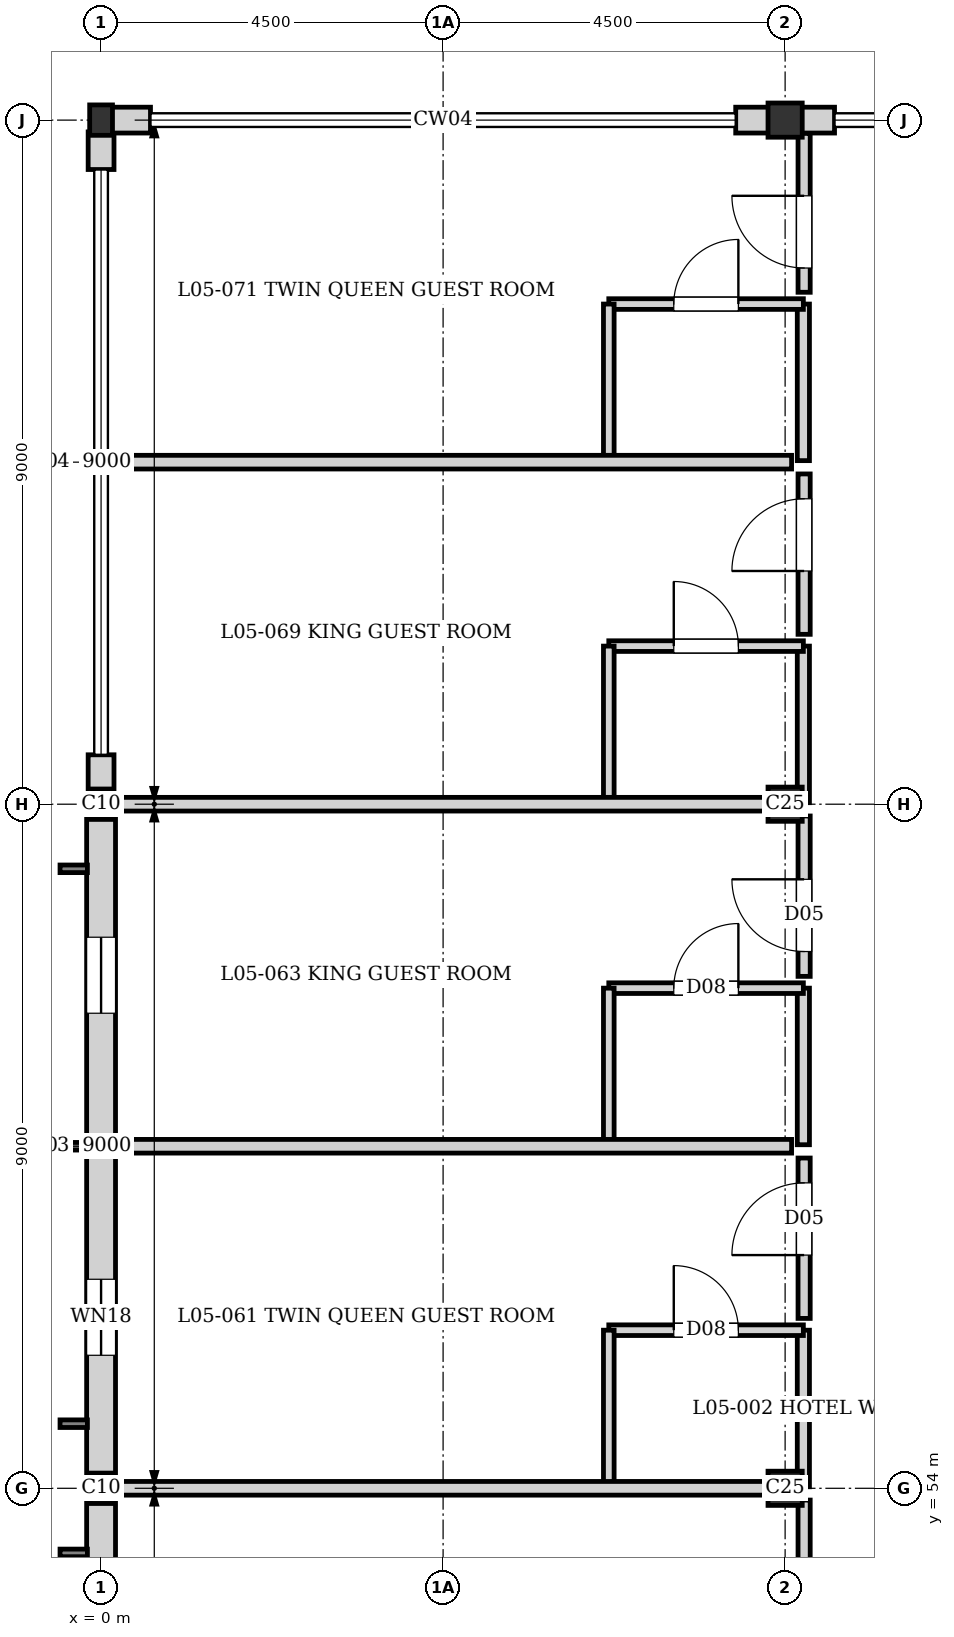
"""IFC4 building model, lengths in metres.
Left out: names, types, materials, properties, quantities, classifications, styles, units other than length and angle.
Written with IfcOpenShell. Run it as: python <this file> out.ifc"""

import sys

from ifc_helpers import new_model, si_unit, direction, frame, frame_2d, origin, origin_2d, place, context, subcontext, project, spatial, rectangle, i_section, extrude, element, fill, save


model = new_model("IFC4")
c1 = context("Model", 3, precision=1e-05, world=origin(), true_north=direction((0.0, 1.0)))
c2 = subcontext(c1, "Body", "Model", "MODEL_VIEW")
j1 = project(units=[si_unit("LENGTHUNIT", "METRE"), si_unit("PLANEANGLEUNIT", "RADIAN")], contexts=[c1])
p1 = place(None, origin())
s1 = spatial("IfcSite", under=j1, at=p1, CompositionType="ELEMENT")
p2 = place(p1, origin())
s2 = spatial("IfcBuilding", under=s1, at=p2, CompositionType="ELEMENT")
p3 = place(p2, frame((0.0, 0.0, 17.6)))
s3 = spatial("IfcBuildingStorey", under=s2, at=p3, CompositionType="ELEMENT", Elevation=17.6)
for number, where, z_axis, x_axis in (
    (1, (0.0, 54.0, 0.0), (0.0, 0.0, 1.0), (1.0, 0.0, 0.0)),
    (2, (0.0, 63.0, 0.0), (0.0, 0.0, 1.0), (1.0, 0.0, 0.0)),
    (3, (0.0, 72.0, 0.0), (0.0, 0.0, 1.0), (1.0, 0.0, 0.0)),
):
    element("IfcColumn", number, at=place(p3, frame(where, z_axis=z_axis, x_axis=x_axis)), inside=s3, PredefinedType="COLUMN", context=c2, shape_type="SweptSolid", body=[
        extrude(i_section(OverallWidth=0.3, OverallDepth=0.4, WebThickness=0.013, FlangeThickness=0.024, at=origin_2d()), origin(), (0.0, 0.0, 1.0), 3.04),
    ])
for number, where, z_axis, x_axis in (
    (4, (9.0, 54.0, 0.0), (0.0, 0.0, 1.0), (1.0, 0.0, 0.0)),
    (5, (9.0, 63.0, 0.0), (0.0, 0.0, 1.0), (1.0, 0.0, 0.0)),
    (6, (9.0, 72.0, 0.0), (0.0, 0.0, 1.0), (1.0, 0.0, 0.0)),
):
    element("IfcColumn", number, at=place(p3, frame(where, z_axis=z_axis, x_axis=x_axis)), inside=s3, PredefinedType="COLUMN", context=c2, shape_type="SweptSolid", body=[
        extrude(rectangle(XDim=0.45, YDim=0.45, at=origin_2d()), origin(), (0.0, 0.0, 1.0), 3.04),
    ])
p4 = place(p3, frame((0.0, 45.13, 0.0), z_axis=(0.0, 0.0, 1.0), x_axis=(0.0, 1.0, 0.0)))
e7 = element("IfcWall", 7, at=p4, inside=s3, PredefinedType="SOLIDWALL", context=c2, shape_type="SweptSolid", body=[
    extrude(rectangle(XDim=8.87, YDim=0.38, at=frame_2d((4.435, 0.0))), origin(), (0.0, 0.0, 1.0), 2.48),
])
p5 = place(p4, frame((1.62, 0.0, 0.35)))
e8 = element("IfcOpeningElement", 8, at=p5, cuts=e7, PredefinedType="OPENING", context=c2, shape_type="SweptSolid", body=[
    extrude(rectangle(XDim=1.0, YDim=1.6, at=frame_2d((0.5, 0.8))), frame((0.0, 0.2, 0.0), z_axis=(0.0, -1.0, 0.0), x_axis=(1.0, 0.0, 0.0)), (0.0, 0.0, 1.0), 0.4),
])
p6 = place(p4, frame((6.12, 0.0, 0.35)))
e9 = element("IfcOpeningElement", 9, at=p6, cuts=e7, PredefinedType="OPENING", context=c2, shape_type="SweptSolid", body=[
    extrude(rectangle(XDim=1.0, YDim=1.6, at=frame_2d((0.5, 0.8))), frame((0.0, 0.2, 0.0), z_axis=(0.0, -1.0, 0.0), x_axis=(1.0, 0.0, 0.0)), (0.0, 0.0, 1.0), 0.4),
])
p7 = place(p3, frame((0.0, 54.0, 0.0), z_axis=(0.0, 0.0, 1.0), x_axis=(0.0, 1.0, 0.0)))
e10 = element("IfcWall", 10, at=p7, inside=s3, PredefinedType="SOLIDWALL", context=c2, shape_type="SweptSolid", body=[
    extrude(rectangle(XDim=9.0, YDim=0.38, at=frame_2d((4.5, 0.0))), origin(), (0.0, 0.0, 1.0), 2.42),
])
p8 = place(p7, frame((1.75, 0.0, 0.35)))
e11 = element("IfcOpeningElement", 11, at=p8, cuts=e10, PredefinedType="OPENING", context=c2, shape_type="SweptSolid", body=[
    extrude(rectangle(XDim=1.0, YDim=1.6, at=frame_2d((0.5, 0.8))), frame((0.0, 0.2, 0.0), z_axis=(0.0, -1.0, 0.0), x_axis=(1.0, 0.0, 0.0)), (0.0, 0.0, 1.0), 0.4),
])
p9 = place(p7, frame((6.25, 0.0, 0.35)))
e12 = element("IfcOpeningElement", 12, at=p9, cuts=e10, PredefinedType="OPENING", context=c2, shape_type="SweptSolid", body=[
    extrude(rectangle(XDim=1.0, YDim=1.6, at=frame_2d((0.5, 0.8))), frame((0.0, 0.2, 0.0), z_axis=(0.0, -1.0, 0.0), x_axis=(1.0, 0.0, 0.0)), (0.0, 0.0, 1.0), 0.4),
])
p10 = place(p3, frame((0.0, 63.0, 0.0), z_axis=(0.0, 0.0, 1.0), x_axis=(0.0, 1.0, 0.0)))
e13 = element("IfcWall", 13, at=p10, inside=s3, PredefinedType="SOLIDWALL", context=c2, shape_type="SweptSolid", body=[
    extrude(rectangle(XDim=0.65, YDim=0.34, at=frame_2d((0.325, 0.0))), origin(), (0.0, 0.0, 1.0), 2.38),
])
p11 = place(p3, frame((0.0, 71.35, 0.0), z_axis=(0.0, 0.0, 1.0), x_axis=(0.0, 1.0, 0.0)))
e14 = element("IfcWall", 14, at=p11, inside=s3, PredefinedType="SOLIDWALL", context=c2, shape_type="SweptSolid", body=[
    extrude(rectangle(XDim=0.495, YDim=0.34, at=frame_2d((0.248, 0.0))), origin(), (0.0, 0.0, 1.0), 2.82),
])
for number, where, z_axis, x_axis in (
    (15, (0.0, 72.0, 0.0), (0.0, 0.0, 1.0), (1.0, 0.0, 0.0)),
    (16, (8.35, 72.0, 0.0), (0.0, 0.0, 1.0), (1.0, 0.0, 0.0)),
):
    element("IfcWall", number, at=place(p3, frame(where, z_axis=z_axis, x_axis=x_axis)), inside=s3, PredefinedType="SOLIDWALL", context=c2, shape_type="SweptSolid", body=[
        extrude(rectangle(XDim=0.65, YDim=0.34, at=frame_2d((0.325, 0.0))), origin(), (0.0, 0.0, 1.0), 2.38),
    ])
p12 = place(p3, frame((9.0, 72.0, 0.0), z_axis=(0.0, 0.0, 1.0), x_axis=(1.0, 0.0, 0.0)))
e17 = element("IfcWall", 17, at=p12, inside=s3, PredefinedType="SOLIDWALL", context=c2, shape_type="SweptSolid", body=[
    extrude(rectangle(XDim=0.65, YDim=0.34, at=frame_2d((0.325, 0.0))), origin(), (0.0, 0.0, 1.0), 2.55),
])
p13 = place(p3, frame((9.24, 54.02, 0.0), z_axis=(0.0, 0.0, 1.0), x_axis=(0.0, 1.0, 0.0)))
e18 = element("IfcWall", 18, at=p13, inside=s3, PredefinedType="PARTITIONING", context=c2, shape_type="SweptSolid", body=[
    extrude(rectangle(XDim=2.06, YDim=0.16, at=frame_2d((1.03, 0.0))), origin(), (0.0, 0.0, 1.0), 2.82),
])
p14 = place(p3, frame((6.68, 56.08, 0.0), z_axis=(0.0, 0.0, 1.0), x_axis=(1.0, 0.0, 0.0)))
e19 = element("IfcWall", 19, at=p14, inside=s3, PredefinedType="PLUMBINGWALL", context=c2, shape_type="SweptSolid", body=[
    extrude(rectangle(XDim=2.56, YDim=0.14, at=frame_2d((1.28, 0.0))), origin(), (0.0, 0.0, 1.0), 2.82),
])
p15 = place(p14, frame((0.855, 0.0, 0.0)))
e20 = element("IfcOpeningElement", 20, at=p15, cuts=e19, PredefinedType="OPENING", context=c2, shape_type="SweptSolid", body=[
    extrude(rectangle(XDim=0.85, YDim=2.04, at=frame_2d((0.425, 1.02))), frame((0.0, 0.08, 0.0), z_axis=(0.0, -1.0, 0.0), x_axis=(1.0, 0.0, 0.0)), (0.0, 0.0, 1.0), 0.16),
])
p16 = place(p3, frame((6.68, 54.02, 0.0), z_axis=(0.0, 0.0, 1.0), x_axis=(0.0, 1.0, 0.0)))
e21 = element("IfcWall", 21, at=p16, inside=s3, PredefinedType="PLUMBINGWALL", context=c2, shape_type="SweptSolid", body=[
    extrude(rectangle(XDim=2.06, YDim=0.14, at=frame_2d((1.03, 0.0))), origin(), (0.0, 0.0, 1.0), 2.82),
])
p17 = place(p3, frame((9.24, 58.52, 0.0), z_axis=(0.0, 0.0, 1.0), x_axis=(0.0, 1.0, 0.0)))
e22 = element("IfcWall", 22, at=p17, inside=s3, PredefinedType="PARTITIONING", context=c2, shape_type="SweptSolid", body=[
    extrude(rectangle(XDim=2.06, YDim=0.16, at=frame_2d((1.03, 0.0))), origin(), (0.0, 0.0, 1.0), 2.82),
])
p18 = place(p3, frame((6.68, 60.58, 0.0), z_axis=(0.0, 0.0, 1.0), x_axis=(1.0, 0.0, 0.0)))
e23 = element("IfcWall", 23, at=p18, inside=s3, PredefinedType="PLUMBINGWALL", context=c2, shape_type="SweptSolid", body=[
    extrude(rectangle(XDim=2.56, YDim=0.14, at=frame_2d((1.28, 0.0))), origin(), (0.0, 0.0, 1.0), 2.82),
])
p19 = place(p18, frame((0.855, 0.0, 0.0)))
e24 = element("IfcOpeningElement", 24, at=p19, cuts=e23, PredefinedType="OPENING", context=c2, shape_type="SweptSolid", body=[
    extrude(rectangle(XDim=0.85, YDim=2.04, at=frame_2d((0.425, 1.02))), frame((0.0, 0.08, 0.0), z_axis=(0.0, -1.0, 0.0), x_axis=(1.0, 0.0, 0.0)), (0.0, 0.0, 1.0), 0.16),
])
p20 = place(p3, frame((6.68, 58.52, 0.0), z_axis=(0.0, 0.0, 1.0), x_axis=(0.0, 1.0, 0.0)))
e25 = element("IfcWall", 25, at=p20, inside=s3, PredefinedType="PLUMBINGWALL", context=c2, shape_type="SweptSolid", body=[
    extrude(rectangle(XDim=2.06, YDim=0.14, at=frame_2d((1.03, 0.0))), origin(), (0.0, 0.0, 1.0), 2.82),
])
p21 = place(p3, frame((9.24, 63.02, 0.0), z_axis=(0.0, 0.0, 1.0), x_axis=(0.0, 1.0, 0.0)))
e26 = element("IfcWall", 26, at=p21, inside=s3, PredefinedType="PARTITIONING", context=c2, shape_type="SweptSolid", body=[
    extrude(rectangle(XDim=2.06, YDim=0.16, at=frame_2d((1.03, 0.0))), origin(), (0.0, 0.0, 1.0), 2.82),
])
p22 = place(p3, frame((6.68, 65.08, 0.0), z_axis=(0.0, 0.0, 1.0), x_axis=(1.0, 0.0, 0.0)))
e27 = element("IfcWall", 27, at=p22, inside=s3, PredefinedType="PLUMBINGWALL", context=c2, shape_type="SweptSolid", body=[
    extrude(rectangle(XDim=2.56, YDim=0.14, at=frame_2d((1.28, 0.0))), origin(), (0.0, 0.0, 1.0), 2.82),
])
p23 = place(p22, frame((0.855, 0.0, 0.0)))
e28 = element("IfcOpeningElement", 28, at=p23, cuts=e27, PredefinedType="OPENING", context=c2, shape_type="SweptSolid", body=[
    extrude(rectangle(XDim=0.85, YDim=2.04, at=frame_2d((0.425, 1.02))), frame((0.0, 0.08, 0.0), z_axis=(0.0, -1.0, 0.0), x_axis=(1.0, 0.0, 0.0)), (0.0, 0.0, 1.0), 0.16),
])
p24 = place(p3, frame((6.68, 63.02, 0.0), z_axis=(0.0, 0.0, 1.0), x_axis=(0.0, 1.0, 0.0)))
e29 = element("IfcWall", 29, at=p24, inside=s3, PredefinedType="PLUMBINGWALL", context=c2, shape_type="SweptSolid", body=[
    extrude(rectangle(XDim=2.06, YDim=0.14, at=frame_2d((1.03, 0.0))), origin(), (0.0, 0.0, 1.0), 2.82),
])
p25 = place(p3, frame((9.24, 67.52, 0.0), z_axis=(0.0, 0.0, 1.0), x_axis=(0.0, 1.0, 0.0)))
e30 = element("IfcWall", 30, at=p25, inside=s3, PredefinedType="PARTITIONING", context=c2, shape_type="SweptSolid", body=[
    extrude(rectangle(XDim=2.06, YDim=0.16, at=frame_2d((1.03, 0.0))), origin(), (0.0, 0.0, 1.0), 2.82),
])
p26 = place(p3, frame((6.68, 69.58, 0.0), z_axis=(0.0, 0.0, 1.0), x_axis=(1.0, 0.0, 0.0)))
e31 = element("IfcWall", 31, at=p26, inside=s3, PredefinedType="PLUMBINGWALL", context=c2, shape_type="SweptSolid", body=[
    extrude(rectangle(XDim=2.56, YDim=0.14, at=frame_2d((1.28, 0.0))), origin(), (0.0, 0.0, 1.0), 2.82),
])
p27 = place(p26, frame((0.855, 0.0, 0.0)))
e32 = element("IfcOpeningElement", 32, at=p27, cuts=e31, PredefinedType="OPENING", context=c2, shape_type="SweptSolid", body=[
    extrude(rectangle(XDim=0.85, YDim=2.04, at=frame_2d((0.425, 1.02))), frame((0.0, 0.08, 0.0), z_axis=(0.0, -1.0, 0.0), x_axis=(1.0, 0.0, 0.0)), (0.0, 0.0, 1.0), 0.16),
])
p28 = place(p3, frame((6.68, 67.52, 0.0), z_axis=(0.0, 0.0, 1.0), x_axis=(0.0, 1.0, 0.0)))
e33 = element("IfcWall", 33, at=p28, inside=s3, PredefinedType="PLUMBINGWALL", context=c2, shape_type="SweptSolid", body=[
    extrude(rectangle(XDim=2.06, YDim=0.14, at=frame_2d((1.03, 0.0))), origin(), (0.0, 0.0, 1.0), 2.82),
])
p29 = place(p3, frame((0.195, 54.0, 0.0), z_axis=(0.0, 0.0, 1.0), x_axis=(1.0, 0.0, 0.0)))
e34 = element("IfcWall", 34, at=p29, inside=s3, PredefinedType="PARTITIONING", context=c2, shape_type="SweptSolid", body=[
    extrude(rectangle(XDim=8.89, YDim=0.18, at=frame_2d((4.445, 0.0))), origin(), (0.0, 0.0, 1.0), 2.38),
])
p30 = place(p3, frame((0.195, 58.5, 0.0), z_axis=(0.0, 0.0, 1.0), x_axis=(1.0, 0.0, 0.0)))
e35 = element("IfcWall", 35, at=p30, inside=s3, PredefinedType="PARTITIONING", context=c2, shape_type="SweptSolid", body=[
    extrude(rectangle(XDim=8.89, YDim=0.18, at=frame_2d((4.445, 0.0))), origin(), (0.0, 0.0, 1.0), 2.82),
])
p31 = place(p3, frame((0.175, 63.0, 0.0), z_axis=(0.0, 0.0, 1.0), x_axis=(1.0, 0.0, 0.0)))
e36 = element("IfcWall", 36, at=p31, inside=s3, PredefinedType="PARTITIONING", context=c2, shape_type="SweptSolid", body=[
    extrude(rectangle(XDim=8.91, YDim=0.18, at=frame_2d((4.455, 0.0))), origin(), (0.0, 0.0, 1.0), 2.38),
])
p32 = place(p3, frame((0.095, 67.5, 0.0), z_axis=(0.0, 0.0, 1.0), x_axis=(1.0, 0.0, 0.0)))
e37 = element("IfcWall", 37, at=p32, inside=s3, PredefinedType="PARTITIONING", context=c2, shape_type="SweptSolid", body=[
    extrude(rectangle(XDim=8.99, YDim=0.18, at=frame_2d((4.495, 0.0))), origin(), (0.0, 0.0, 1.0), 2.82),
])
p33 = place(p3, frame((9.25, 51.735, 0.0), z_axis=(0.0, 0.0, 1.0), x_axis=(0.0, 1.0, 0.0)))
e38 = element("IfcWall", 38, at=p33, inside=s3, PredefinedType="PARTITIONING", context=c2, shape_type="SweptSolid", body=[
    extrude(rectangle(XDim=2.11, YDim=0.16, at=frame_2d((1.055, 0.0))), origin(), (0.0, 0.0, 1.0), 2.82),
])
p34 = place(p33, frame((0.327, 0.0, 0.0)))
e39 = element("IfcOpeningElement", 39, at=p34, cuts=e38, PredefinedType="OPENING", context=c2, shape_type="SweptSolid", body=[
    extrude(rectangle(XDim=0.95, YDim=2.15, at=frame_2d((0.475, 1.075))), frame((0.0, 0.09, 0.0), z_axis=(0.0, -1.0, 0.0), x_axis=(1.0, 0.0, 0.0)), (0.0, 0.0, 1.0), 0.18),
])
p35 = place(p3, frame((9.25, 56.235, 0.0), z_axis=(0.0, 0.0, 1.0), x_axis=(0.0, 1.0, 0.0)))
e40 = element("IfcWall", 40, at=p35, inside=s3, PredefinedType="PARTITIONING", context=c2, shape_type="SweptSolid", body=[
    extrude(rectangle(XDim=2.11, YDim=0.16, at=frame_2d((1.055, 0.0))), origin(), (0.0, 0.0, 1.0), 2.82),
])
p36 = place(p35, frame((0.833, 0.0, 0.0)))
e41 = element("IfcOpeningElement", 41, at=p36, cuts=e40, PredefinedType="OPENING", context=c2, shape_type="SweptSolid", body=[
    extrude(rectangle(XDim=0.95, YDim=2.15, at=frame_2d((0.475, 1.075))), frame((0.0, 0.09, 0.0), z_axis=(0.0, -1.0, 0.0), x_axis=(1.0, 0.0, 0.0)), (0.0, 0.0, 1.0), 0.18),
])
p37 = place(p3, frame((9.25, 60.735, 0.0), z_axis=(0.0, 0.0, 1.0), x_axis=(0.0, 1.0, 0.0)))
e42 = element("IfcWall", 42, at=p37, inside=s3, PredefinedType="PARTITIONING", context=c2, shape_type="SweptSolid", body=[
    extrude(rectangle(XDim=2.11, YDim=0.16, at=frame_2d((1.055, 0.0))), origin(), (0.0, 0.0, 1.0), 2.82),
])
p38 = place(p37, frame((0.327, 0.0, 0.0)))
e43 = element("IfcOpeningElement", 43, at=p38, cuts=e42, PredefinedType="OPENING", context=c2, shape_type="SweptSolid", body=[
    extrude(rectangle(XDim=0.95, YDim=2.15, at=frame_2d((0.475, 1.075))), frame((0.0, 0.09, 0.0), z_axis=(0.0, -1.0, 0.0), x_axis=(1.0, 0.0, 0.0)), (0.0, 0.0, 1.0), 0.18),
])
p39 = place(p3, frame((9.25, 65.235, 0.0), z_axis=(0.0, 0.0, 1.0), x_axis=(0.0, 1.0, 0.0)))
e44 = element("IfcWall", 44, at=p39, inside=s3, PredefinedType="PARTITIONING", context=c2, shape_type="SweptSolid", body=[
    extrude(rectangle(XDim=2.11, YDim=0.16, at=frame_2d((1.055, 0.0))), origin(), (0.0, 0.0, 1.0), 2.82),
])
p40 = place(p39, frame((0.833, 0.0, 0.0)))
e45 = element("IfcOpeningElement", 45, at=p40, cuts=e44, PredefinedType="OPENING", context=c2, shape_type="SweptSolid", body=[
    extrude(rectangle(XDim=0.95, YDim=2.15, at=frame_2d((0.475, 1.075))), frame((0.0, 0.09, 0.0), z_axis=(0.0, -1.0, 0.0), x_axis=(1.0, 0.0, 0.0)), (0.0, 0.0, 1.0), 0.18),
])
p41 = place(p3, frame((9.25, 69.735, 0.0), z_axis=(0.0, 0.0, 1.0), x_axis=(0.0, 1.0, 0.0)))
e46 = element("IfcWall", 46, at=p41, inside=s3, PredefinedType="PARTITIONING", context=c2, shape_type="SweptSolid", body=[
    extrude(rectangle(XDim=2.09, YDim=0.16, at=frame_2d((1.045, 0.0))), origin(), (0.0, 0.0, 1.0), 2.82),
])
p42 = place(p41, frame((0.319, 0.0, 0.0)))
e47 = element("IfcOpeningElement", 47, at=p42, cuts=e46, PredefinedType="OPENING", context=c2, shape_type="SweptSolid", body=[
    extrude(rectangle(XDim=0.95, YDim=2.15, at=frame_2d((0.475, 1.075))), frame((0.0, 0.09, 0.0), z_axis=(0.0, -1.0, 0.0), x_axis=(1.0, 0.0, 0.0)), (0.0, 0.0, 1.0), 0.18),
])
p43 = place(p8, origin())
e48 = element("IfcWindow", 48, at=p43, inside=s3, PartitioningType="SINGLE_PANEL", PredefinedType="WINDOW", context=c2, shape_type="SweptSolid", body=[
    extrude(rectangle(XDim=1.0, YDim=1.6, at=frame_2d((0.5, 0.8))), frame((0.0, 0.03, 0.0), z_axis=(0.0, -1.0, 0.0), x_axis=(1.0, 0.0, 0.0)), (0.0, 0.0, 1.0), 0.06),
])
fill(e11, e48)
p44 = place(p9, origin())
e49 = element("IfcWindow", 49, at=p44, inside=s3, PartitioningType="SINGLE_PANEL", PredefinedType="WINDOW", context=c2, shape_type="SweptSolid", body=[
    extrude(rectangle(XDim=1.0, YDim=1.6, at=frame_2d((0.5, 0.8))), frame((0.0, 0.03, 0.0), z_axis=(0.0, -1.0, 0.0), x_axis=(1.0, 0.0, 0.0)), (0.0, 0.0, 1.0), 0.06),
])
fill(e12, e49)
p45 = place(p15, origin())
e50 = element("IfcDoor", 50, at=p45, inside=s3, OperationType="SINGLE_SWING_LEFT", PredefinedType="DOOR", context=c2, shape_type="SweptSolid", body=[
    extrude(rectangle(XDim=0.85, YDim=2.04, at=frame_2d((0.425, 1.02))), frame((0.0, 0.025, 0.0), z_axis=(0.0, -1.0, 0.0), x_axis=(1.0, 0.0, 0.0)), (0.0, 0.0, 1.0), 0.05),
])
fill(e20, e50)
p46 = place(p19, origin())
e51 = element("IfcDoor", 51, at=p46, inside=s3, OperationType="SINGLE_SWING_RIGHT", PredefinedType="DOOR", context=c2, shape_type="SweptSolid", body=[
    extrude(rectangle(XDim=0.85, YDim=2.04, at=frame_2d((0.425, 1.02))), frame((0.0, 0.025, 0.0), z_axis=(0.0, -1.0, 0.0), x_axis=(1.0, 0.0, 0.0)), (0.0, 0.0, 1.0), 0.05),
])
fill(e24, e51)
p47 = place(p23, origin())
e52 = element("IfcDoor", 52, at=p47, inside=s3, OperationType="SINGLE_SWING_LEFT", PredefinedType="DOOR", context=c2, shape_type="SweptSolid", body=[
    extrude(rectangle(XDim=0.85, YDim=2.04, at=frame_2d((0.425, 1.02))), frame((0.0, 0.025, 0.0), z_axis=(0.0, -1.0, 0.0), x_axis=(1.0, 0.0, 0.0)), (0.0, 0.0, 1.0), 0.05),
])
fill(e28, e52)
p48 = place(p27, origin())
e53 = element("IfcDoor", 53, at=p48, inside=s3, OperationType="SINGLE_SWING_RIGHT", PredefinedType="DOOR", context=c2, shape_type="SweptSolid", body=[
    extrude(rectangle(XDim=0.85, YDim=2.04, at=frame_2d((0.425, 1.02))), frame((0.0, 0.025, 0.0), z_axis=(0.0, -1.0, 0.0), x_axis=(1.0, 0.0, 0.0)), (0.0, 0.0, 1.0), 0.05),
])
fill(e32, e53)
p49 = place(p36, origin())
e54 = element("IfcDoor", 54, at=p49, inside=s3, OperationType="SINGLE_SWING_LEFT", PredefinedType="DOOR", context=c2, shape_type="SweptSolid", body=[
    extrude(rectangle(XDim=0.95, YDim=2.15, at=frame_2d((0.475, 1.075))), frame((0.0, 0.025, 0.0), z_axis=(0.0, -1.0, 0.0), x_axis=(1.0, 0.0, 0.0)), (0.0, 0.0, 1.0), 0.05),
])
fill(e41, e54)
p50 = place(p38, origin())
e55 = element("IfcDoor", 55, at=p50, inside=s3, OperationType="SINGLE_SWING_RIGHT", PredefinedType="DOOR", context=c2, shape_type="SweptSolid", body=[
    extrude(rectangle(XDim=0.95, YDim=2.15, at=frame_2d((0.475, 1.075))), frame((0.0, 0.025, 0.0), z_axis=(0.0, -1.0, 0.0), x_axis=(1.0, 0.0, 0.0)), (0.0, 0.0, 1.0), 0.05),
])
fill(e43, e55)
p51 = place(p40, origin())
e56 = element("IfcDoor", 56, at=p51, inside=s3, OperationType="SINGLE_SWING_LEFT", PredefinedType="DOOR", context=c2, shape_type="SweptSolid", body=[
    extrude(rectangle(XDim=0.95, YDim=2.15, at=frame_2d((0.475, 1.075))), frame((0.0, 0.025, 0.0), z_axis=(0.0, -1.0, 0.0), x_axis=(1.0, 0.0, 0.0)), (0.0, 0.0, 1.0), 0.05),
])
fill(e45, e56)
p52 = place(p42, origin())
e57 = element("IfcDoor", 57, at=p52, inside=s3, OperationType="SINGLE_SWING_RIGHT", PredefinedType="DOOR", context=c2, shape_type="SweptSolid", body=[
    extrude(rectangle(XDim=0.95, YDim=2.15, at=frame_2d((0.475, 1.075))), frame((0.0, 0.025, 0.0), z_axis=(0.0, -1.0, 0.0), x_axis=(1.0, 0.0, 0.0)), (0.0, 0.0, 1.0), 0.05),
])
fill(e47, e57)
save(model, sys.argv[1])
